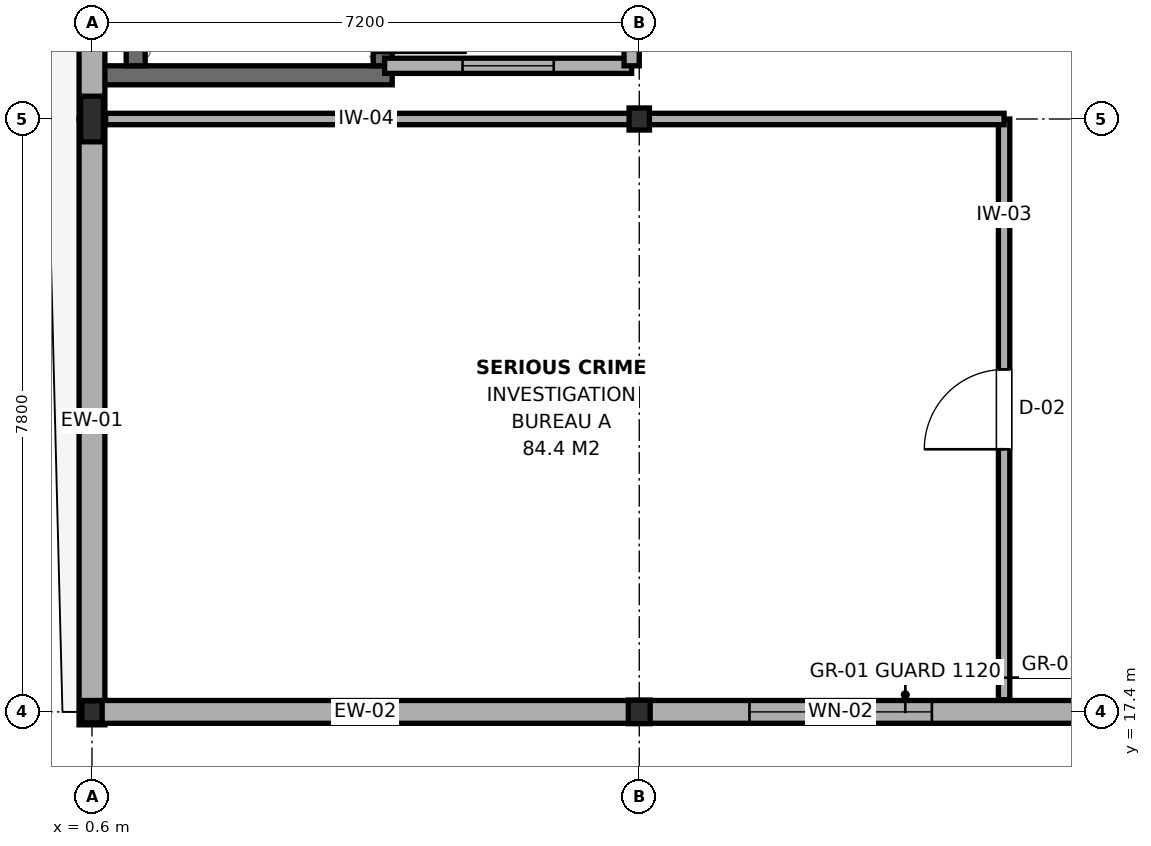
"""IFC4 building model, lengths in metres.
Left out: names, types, materials, properties, quantities, classifications, styles, units other than length and angle.
Written with IfcOpenShell. Run it as: python <this file> out.ifc"""

import sys

from ifc_helpers import new_model, si_unit, direction, frame, frame_2d, origin, origin_2d, place, context, subcontext, project, spatial, rectangle, i_section, extrude, element, fill, save


model = new_model("IFC4")
c1 = context("Model", 3, precision=1e-05, world=origin(), true_north=direction((0.0, 1.0)))
c2 = subcontext(c1, "Body", "Model", "MODEL_VIEW")
j1 = project(units=[si_unit("LENGTHUNIT", "METRE"), si_unit("PLANEANGLEUNIT", "RADIAN")], contexts=[c1])
p1 = place(None, origin())
s1 = spatial("IfcSite", under=j1, at=p1, CompositionType="ELEMENT")
p2 = place(p1, origin())
s2 = spatial("IfcBuilding", under=s1, at=p2, CompositionType="ELEMENT")
p3 = place(p2, frame((0.0, 0.0, 13.2)))
s3 = spatial("IfcBuildingStorey", under=s2, at=p3, CompositionType="ELEMENT", Elevation=13.2)
p4 = place(p3, frame((0.6, 17.4, 0.0), z_axis=(0.0, 0.0, 1.0), x_axis=(1.0, 0.0, 0.0)))
e1 = element("IfcColumn", 1, at=p4, inside=s3, PredefinedType="COLUMN", context=c2, shape_type="SweptSolid", body=[
    extrude(i_section(OverallWidth=0.268, OverallDepth=0.29, WebThickness=0.018, FlangeThickness=0.032, FilletRadius=0.024, at=origin_2d()), origin(), (0.0, 0.0, 1.0), 3.9),
])
p5 = place(p3, frame((0.6, 25.2, 0.0), z_axis=(0.0, 0.0, 1.0), x_axis=(1.0, 0.0, 0.0)))
e2 = element("IfcColumn", 2, at=p5, inside=s3, PredefinedType="COLUMN", context=c2, shape_type="SweptSolid", body=[
    extrude(i_section(OverallWidth=0.3, OverallDepth=0.6, WebThickness=0.015, FlangeThickness=0.03, FilletRadius=0.027, at=origin_2d()), origin(), (0.0, 0.0, 1.0), 3.9),
])
p6 = place(p3, frame((7.8, 17.4, 0.0), z_axis=(0.0, 0.0, 1.0), x_axis=(1.0, 0.0, 0.0)))
e3 = element("IfcColumn", 3, at=p6, inside=s3, PredefinedType="COLUMN", context=c2, shape_type="SweptSolid", body=[
    extrude(i_section(OverallWidth=0.288, OverallDepth=0.31, WebThickness=0.019, FlangeThickness=0.033, FilletRadius=0.024, at=origin_2d()), origin(), (0.0, 0.0, 1.0), 3.9),
])
p7 = place(p3, frame((7.8, 25.2, 0.0), z_axis=(0.0, 0.0, 1.0), x_axis=(1.0, 0.0, 0.0)))
e4 = element("IfcColumn", 4, at=p7, inside=s3, PredefinedType="COLUMN", context=c2, shape_type="SweptSolid", body=[
    extrude(i_section(OverallWidth=0.268, OverallDepth=0.29, WebThickness=0.018, FlangeThickness=0.032, FilletRadius=0.024, at=origin_2d()), origin(), (0.0, 0.0, 1.0), 3.9),
])
p8 = place(p3, frame((0.75, 25.775, 0.0), z_axis=(0.0, 0.0, 1.0), x_axis=(1.0, 0.0, 0.0)))
e5 = element("IfcWall", 5, at=p8, inside=s3, PredefinedType="SHEAR", context=c2, shape_type="SweptSolid", body=[
    extrude(rectangle(XDim=3.8, YDim=0.25, at=frame_2d((1.9, 0.0))), origin(), (0.0, 0.0, 1.0), 3.7),
])
p9 = place(p3, frame((1.175, 25.9, 0.0), z_axis=(0.0, 0.0, 1.0), x_axis=(0.0, 1.0, 0.0)))
e6 = element("IfcWall", 6, at=p9, inside=s3, PredefinedType="SHEAR", context=c2, shape_type="SweptSolid", body=[
    extrude(rectangle(XDim=6.4, YDim=0.25, at=frame_2d((3.2, 0.0))), origin(), (0.0, 0.0, 1.0), 3.7),
])
p10 = place(p3, frame((4.425, 25.9, 0.0), z_axis=(0.0, 0.0, 1.0), x_axis=(0.0, 1.0, 0.0)))
e7 = element("IfcWall", 7, at=p10, inside=s3, PredefinedType="SHEAR", context=c2, shape_type="SweptSolid", body=[
    extrude(rectangle(XDim=6.4, YDim=0.25, at=frame_2d((3.2, 0.0))), origin(), (0.0, 0.0, 1.0), 3.7),
])
p11 = place(p10, frame((0.17, 0.0, 0.0)))
e8 = element("IfcOpeningElement", 8, at=p11, cuts=e7, PredefinedType="OPENING", context=c2, shape_type="SweptSolid", body=[
    extrude(rectangle(XDim=1.1, YDim=2.15, at=frame_2d((0.55, 1.075))), frame((0.0, 0.14, 0.0), z_axis=(0.0, -1.0, 0.0), x_axis=(1.0, 0.0, 0.0)), (0.0, 0.0, 1.0), 0.28),
])
p12 = place(p3, frame((0.6, 17.23, 0.0), z_axis=(0.0, 0.0, 1.0), x_axis=(0.0, 1.0, 0.0)))
e9 = element("IfcWall", 9, at=p12, inside=s3, PredefinedType="SOLIDWALL", context=c2, shape_type="SweptSolid", body=[
    extrude(rectangle(XDim=7.97, YDim=0.34, at=frame_2d((3.985, 0.0))), origin(), (0.0, 0.0, 1.0), 3.145),
])
p13 = place(p3, frame((0.6, 25.2, 0.0), z_axis=(0.0, 0.0, 1.0), x_axis=(0.0, 1.0, 0.0)))
e10 = element("IfcWall", 10, at=p13, inside=s3, PredefinedType="SOLIDWALL", context=c2, shape_type="SweptSolid", body=[
    extrude(rectangle(XDim=5.6, YDim=0.34, at=frame_2d((2.8, 0.0))), origin(), (0.0, 0.0, 1.0), 3.195),
])
p14 = place(p3, frame((0.45, 17.4, 0.0), z_axis=(0.0, 0.0, 1.0), x_axis=(1.0, 0.0, 0.0)))
e11 = element("IfcWall", 11, at=p14, inside=s3, PredefinedType="SOLIDWALL", context=c2, shape_type="SweptSolid", body=[
    extrude(rectangle(XDim=7.35, YDim=0.3, at=frame_2d((3.675, 0.0))), origin(), (0.0, 0.0, 1.0), 3.245),
])
p15 = place(p3, frame((7.8, 17.4, 0.0), z_axis=(0.0, 0.0, 1.0), x_axis=(1.0, 0.0, 0.0)))
e12 = element("IfcWall", 12, at=p15, inside=s3, PredefinedType="SOLIDWALL", context=c2, shape_type="SweptSolid", body=[
    extrude(rectangle(XDim=7.2, YDim=0.3, at=frame_2d((3.6, 0.0))), origin(), (0.0, 0.0, 1.0), 3.245),
])
p16 = place(p15, frame((1.45, 0.0, 0.9)))
e13 = element("IfcOpeningElement", 13, at=p16, cuts=e12, PredefinedType="OPENING", context=c2, shape_type="SweptSolid", body=[
    extrude(rectangle(XDim=2.4, YDim=2.1, at=frame_2d((1.2, 1.05))), frame((0.0, 0.165, 0.0), z_axis=(0.0, -1.0, 0.0), x_axis=(1.0, 0.0, 0.0)), (0.0, 0.0, 1.0), 0.33),
])
p17 = place(p3, frame((4.45, 25.9, 0.0), z_axis=(0.0, 0.0, 1.0), x_axis=(1.0, 0.0, 0.0)))
e14 = element("IfcWall", 14, at=p17, inside=s3, PredefinedType="PARTITIONING", context=c2, shape_type="SweptSolid", body=[
    extrude(rectangle(XDim=3.25, YDim=0.2, at=frame_2d((1.625, 0.0))), origin(), (0.0, 0.0, 1.0), 3.095),
])
p18 = place(p17, frame((1.025, 0.0, 0.95)))
e15 = element("IfcOpeningElement", 15, at=p18, cuts=e14, PredefinedType="OPENING", context=c2, shape_type="SweptSolid", body=[
    extrude(rectangle(XDim=1.2, YDim=1.5, at=frame_2d((0.6, 0.75))), frame((0.0, 0.115, 0.0), z_axis=(0.0, -1.0, 0.0), x_axis=(1.0, 0.0, 0.0)), (0.0, 0.0, 1.0), 0.23),
])
p19 = place(p3, frame((7.7, 25.9, 0.0), z_axis=(0.0, 0.0, 1.0), x_axis=(0.0, 1.0, 0.0)))
e16 = element("IfcWall", 16, at=p19, inside=s3, PredefinedType="PARTITIONING", context=c2, shape_type="SweptSolid", body=[
    extrude(rectangle(XDim=3.6, YDim=0.2, at=frame_2d((1.8, 0.0))), origin(), (0.0, 0.0, 1.0), 3.095),
])
p20 = place(p19, frame((1.25, 0.0, 0.0)))
e17 = element("IfcOpeningElement", 17, at=p20, cuts=e16, PredefinedType="OPENING", context=c2, shape_type="SweptSolid", body=[
    extrude(rectangle(XDim=1.1, YDim=2.15, at=frame_2d((0.55, 1.075))), frame((0.0, 0.115, 0.0), z_axis=(0.0, -1.0, 0.0), x_axis=(1.0, 0.0, 0.0)), (0.0, 0.0, 1.0), 0.23),
])
p21 = place(p3, frame((12.6, 17.56, 0.0), z_axis=(0.0, 0.0, 1.0), x_axis=(0.0, 1.0, 0.0)))
e18 = element("IfcWall", 18, at=p21, inside=s3, PredefinedType="PARTITIONING", context=c2, shape_type="SweptSolid", body=[
    extrude(rectangle(XDim=7.64, YDim=0.15, at=frame_2d((3.82, 0.0))), origin(), (0.0, 0.0, 1.0), 3.145),
])
p22 = place(p21, frame((3.295, 0.0, 0.0)))
e19 = element("IfcOpeningElement", 19, at=p22, cuts=e18, PredefinedType="OPENING", context=c2, shape_type="SweptSolid", body=[
    extrude(rectangle(XDim=1.05, YDim=2.15, at=frame_2d((0.525, 1.075))), frame((0.0, 0.09, 0.0), z_axis=(0.0, -1.0, 0.0), x_axis=(1.0, 0.0, 0.0)), (0.0, 0.0, 1.0), 0.18),
])
p23 = place(p3, frame((0.78, 25.2, 0.0), z_axis=(0.0, 0.0, 1.0), x_axis=(1.0, 0.0, 0.0)))
e20 = element("IfcWall", 20, at=p23, inside=s3, PredefinedType="PARTITIONING", context=c2, shape_type="SweptSolid", body=[
    extrude(rectangle(XDim=11.82, YDim=0.15, at=frame_2d((5.91, 0.0))), origin(), (0.0, 0.0, 1.0), 3.095),
])
p24 = place(p16, origin())
e21 = element("IfcWindow", 21, at=p24, inside=s3, PartitioningType="SINGLE_PANEL", PredefinedType="WINDOW", context=c2, shape_type="SweptSolid", body=[
    extrude(rectangle(XDim=2.4, YDim=2.1, at=frame_2d((1.2, 1.05))), frame((0.0, 0.03, 0.0), z_axis=(0.0, -1.0, 0.0), x_axis=(1.0, 0.0, 0.0)), (0.0, 0.0, 1.0), 0.06),
])
fill(e13, e21)
p25 = place(p11, frame((1.1, 0.0, 0.0), z_axis=(0.0, 0.0, 1.0), x_axis=(-1.0, 0.0, 0.0)))
e22 = element("IfcDoor", 22, at=p25, inside=s3, OperationType="SINGLE_SWING_RIGHT", PredefinedType="DOOR", context=c2, shape_type="SweptSolid", body=[
    extrude(rectangle(XDim=1.1, YDim=2.15, at=frame_2d((0.55, 1.075))), frame((0.0, 0.025, 0.0), z_axis=(0.0, -1.0, 0.0), x_axis=(1.0, 0.0, 0.0)), (0.0, 0.0, 1.0), 0.05),
])
fill(e8, e22)
p26 = place(p18, origin())
e23 = element("IfcWindow", 23, at=p26, inside=s3, PartitioningType="SINGLE_PANEL", PredefinedType="WINDOW", context=c2, shape_type="SweptSolid", body=[
    extrude(rectangle(XDim=1.2, YDim=1.5, at=frame_2d((0.6, 0.75))), frame((0.0, 0.03, 0.0), z_axis=(0.0, -1.0, 0.0), x_axis=(1.0, 0.0, 0.0)), (0.0, 0.0, 1.0), 0.06),
])
fill(e15, e23)
p27 = place(p22, origin())
e24 = element("IfcDoor", 24, at=p27, inside=s3, OperationType="SINGLE_SWING_LEFT", PredefinedType="DOOR", context=c2, shape_type="SweptSolid", body=[
    extrude(rectangle(XDim=1.05, YDim=2.15, at=frame_2d((0.525, 1.075))), frame((0.0, 0.025, 0.0), z_axis=(0.0, -1.0, 0.0), x_axis=(1.0, 0.0, 0.0)), (0.0, 0.0, 1.0), 0.05),
])
fill(e19, e24)
save(model, sys.argv[1])
